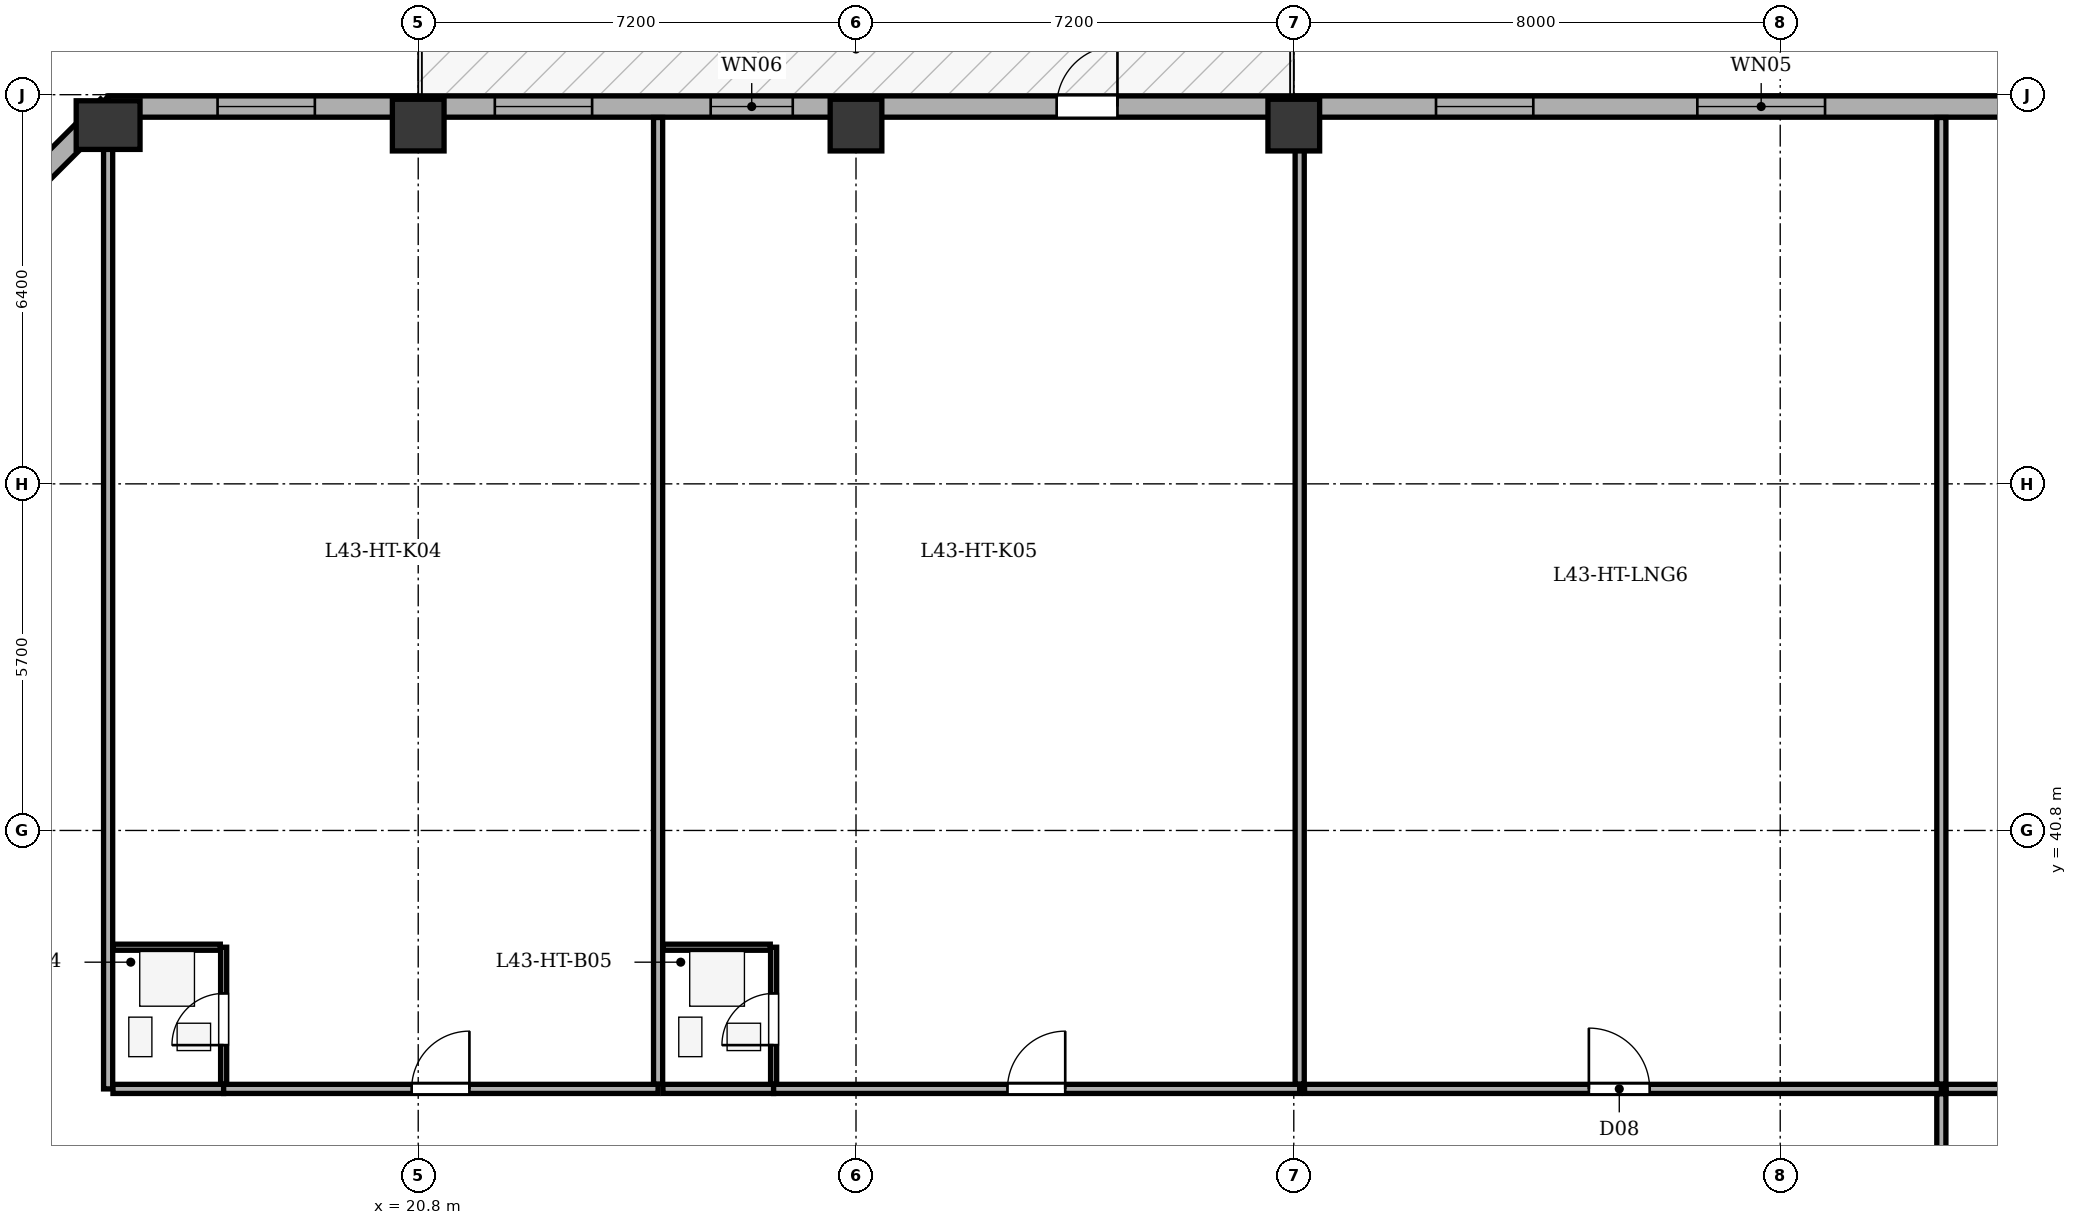
"""IFC4 building model, lengths in metres.
Left out: names, types, materials, properties, quantities, classifications, styles, units other than length and angle.
Written with IfcOpenShell. Run it as: python <this file> out.ifc"""

import sys

from ifc_helpers import new_model, si_unit, direction, frame, frame_2d, origin, origin_2d, place, context, subcontext, project, spatial, rectangle, extrude, element, fill, save


model = new_model("IFC4")
c1 = context("Model", 3, precision=1e-05, world=origin(), true_north=direction((0.0, 1.0)))
c2 = subcontext(c1, "Body", "Model", "MODEL_VIEW")
j1 = project(units=[si_unit("LENGTHUNIT", "METRE"), si_unit("PLANEANGLEUNIT", "RADIAN")], contexts=[c1])
p1 = place(None, origin())
s1 = spatial("IfcSite", under=j1, at=p1, CompositionType="ELEMENT")
p2 = place(p1, origin())
s2 = spatial("IfcBuilding", under=s1, at=p2, CompositionType="ELEMENT")
p3 = place(p2, frame((0.0, 0.0, 169.3)))
s3 = spatial("IfcBuildingStorey", under=s2, at=p3, CompositionType="ELEMENT", Elevation=169.3)
p4 = place(p3, frame((15.7, 52.4, 0.0), z_axis=(0.0, 0.0, 1.0), x_axis=(1.0, 0.0, 0.0)))
e1 = element("IfcColumn", 1, at=p4, inside=s3, PredefinedType="COLUMN", context=c2, shape_type="SweptSolid", body=[
    extrude(rectangle(XDim=0.8, YDim=1.05, at=origin_2d()), origin(), (0.0, 0.0, 1.0), 3.5),
])
for number, where, z_axis, x_axis in (
    (2, (20.8, 52.4, 0.0), (0.0, 0.0, 1.0), (1.0, 0.0, 0.0)),
    (3, (28.0, 52.4, 0.0), (0.0, 0.0, 1.0), (1.0, 0.0, 0.0)),
    (4, (35.2, 52.4, 0.0), (0.0, 0.0, 1.0), (1.0, 0.0, 0.0)),
):
    element("IfcColumn", number, at=place(p3, frame(where, z_axis=z_axis, x_axis=x_axis)), inside=s3, PredefinedType="COLUMN", context=c2, shape_type="SweptSolid", body=[
        extrude(rectangle(XDim=0.85, YDim=0.85, at=origin_2d()), origin(), (0.0, 0.0, 1.0), 3.5),
    ])
p5 = place(p3, frame((10.895, 47.9, 0.0), z_axis=(0.0, 0.0, 1.0), x_axis=(0.707088817216, 0.7071247447, 0.0)))
e5 = element("IfcWall", 5, at=p5, inside=s3, PredefinedType="STANDARD", context=c2, shape_type="SweptSolid", body=[
    extrude(rectangle(XDim=6.795, YDim=0.35, at=frame_2d((3.398, 0.0))), origin(), (0.0, 0.0, 1.0), 2.785),
])
p6 = place(p5, frame((2.698, 0.0, 0.75)))
e6 = element("IfcOpeningElement", 6, at=p6, cuts=e5, PredefinedType="OPENING", context=c2, shape_type="SweptSolid", body=[
    extrude(rectangle(XDim=1.4, YDim=1.65, at=frame_2d((0.7, 0.825))), frame((0.0, 0.185, 0.0), z_axis=(0.0, -1.0, 0.0), x_axis=(1.0, 0.0, 0.0)), (0.0, 0.0, 1.0), 0.37),
])
p7 = place(p3, frame((15.7, 52.705, 0.0), z_axis=(0.0, 0.0, 1.0), x_axis=(1.0, 0.0, 0.0)))
e7 = element("IfcWall", 7, at=p7, inside=s3, PredefinedType="STANDARD", context=c2, shape_type="SweptSolid", body=[
    extrude(rectangle(XDim=35.0, YDim=0.35, at=frame_2d((17.5, 0.0))), origin(), (0.0, 0.0, 1.0), 2.785),
])
p8 = place(p7, frame((15.6, 0.0, 0.0)))
e8 = element("IfcOpeningElement", 8, at=p8, cuts=e7, PredefinedType="OPENING", context=c2, shape_type="SweptSolid", body=[
    extrude(rectangle(XDim=1.0, YDim=2.02, at=frame_2d((0.5, 1.01))), frame((0.0, 0.185, 0.0), z_axis=(0.0, -1.0, 0.0), x_axis=(1.0, 0.0, 0.0)), (0.0, 0.0, 1.0), 0.37),
])
p9 = place(p7, frame((1.8, 0.0, 0.75)))
e9 = element("IfcOpeningElement", 9, at=p9, cuts=e7, PredefinedType="OPENING", context=c2, shape_type="SweptSolid", body=[
    extrude(rectangle(XDim=1.6, YDim=1.75, at=frame_2d((0.8, 0.875))), frame((0.0, 0.185, 0.0), z_axis=(0.0, -1.0, 0.0), x_axis=(1.0, 0.0, 0.0)), (0.0, 0.0, 1.0), 0.37),
])
p10 = place(p7, frame((6.36, 0.0, 0.75)))
e10 = element("IfcOpeningElement", 10, at=p10, cuts=e7, PredefinedType="OPENING", context=c2, shape_type="SweptSolid", body=[
    extrude(rectangle(XDim=1.6, YDim=1.75, at=frame_2d((0.8, 0.875))), frame((0.0, 0.185, 0.0), z_axis=(0.0, -1.0, 0.0), x_axis=(1.0, 0.0, 0.0)), (0.0, 0.0, 1.0), 0.37),
])
p11 = place(p7, frame((9.91, 0.0, 0.75)))
e11 = element("IfcOpeningElement", 11, at=p11, cuts=e7, PredefinedType="OPENING", context=c2, shape_type="SweptSolid", body=[
    extrude(rectangle(XDim=1.35, YDim=1.75, at=frame_2d((0.675, 0.875))), frame((0.0, 0.185, 0.0), z_axis=(0.0, -1.0, 0.0), x_axis=(1.0, 0.0, 0.0)), (0.0, 0.0, 1.0), 0.37),
])
p12 = place(p7, frame((21.839, 0.0, 0.75)))
e12 = element("IfcOpeningElement", 12, at=p12, cuts=e7, PredefinedType="OPENING", context=c2, shape_type="SweptSolid", body=[
    extrude(rectangle(XDim=1.6, YDim=1.75, at=frame_2d((0.8, 0.875))), frame((0.0, 0.185, 0.0), z_axis=(0.0, -1.0, 0.0), x_axis=(1.0, 0.0, 0.0)), (0.0, 0.0, 1.0), 0.37),
])
p13 = place(p7, frame((26.137, 0.0, 0.75)))
e13 = element("IfcOpeningElement", 13, at=p13, cuts=e7, PredefinedType="OPENING", context=c2, shape_type="SweptSolid", body=[
    extrude(rectangle(XDim=2.1, YDim=1.75, at=frame_2d((1.05, 0.875))), frame((0.0, 0.185, 0.0), z_axis=(0.0, -1.0, 0.0), x_axis=(1.0, 0.0, 0.0)), (0.0, 0.0, 1.0), 0.37),
])
p14 = place(p7, frame((31.637, 0.0, 0.75)))
e14 = element("IfcOpeningElement", 14, at=p14, cuts=e7, PredefinedType="OPENING", context=c2, shape_type="SweptSolid", body=[
    extrude(rectangle(XDim=1.6, YDim=1.75, at=frame_2d((0.8, 0.875))), frame((0.0, 0.185, 0.0), z_axis=(0.0, -1.0, 0.0), x_axis=(1.0, 0.0, 0.0)), (0.0, 0.0, 1.0), 0.37),
])
p15 = place(p3, frame((15.7, 36.55, 0.0), z_axis=(0.0, 0.0, 1.0), x_axis=(0.0, 1.0, 0.0)))
e15 = element("IfcWall", 15, at=p15, inside=s3, PredefinedType="PARTITIONING", context=c2, shape_type="SweptSolid", body=[
    extrude(rectangle(XDim=15.975, YDim=0.15, at=frame_2d((7.987, 0.0))), origin(), (0.0, 0.0, 1.0), 3.2),
])
p16 = place(p3, frame((15.78, 36.55, 0.0), z_axis=(0.0, 0.0, 1.0), x_axis=(1.0, 0.0, 0.0)))
e16 = element("IfcWall", 16, at=p16, inside=s3, PredefinedType="PARTITIONING", context=c2, shape_type="SweptSolid", body=[
    extrude(rectangle(XDim=1.82, YDim=0.15, at=frame_2d((0.91, 0.0))), origin(), (0.0, 0.0, 1.0), 3.2),
])
p17 = place(p3, frame((17.6, 36.55, 0.0), z_axis=(0.0, 0.0, 1.0), x_axis=(1.0, 0.0, 0.0)))
e17 = element("IfcWall", 17, at=p17, inside=s3, PredefinedType="PARTITIONING", context=c2, shape_type="SweptSolid", body=[
    extrude(rectangle(XDim=7.145, YDim=0.15, at=frame_2d((3.573, 0.0))), origin(), (0.0, 0.0, 1.0), 3.2),
])
p18 = place(p17, frame((3.092, 0.0, 0.0)))
e18 = element("IfcOpeningElement", 18, at=p18, cuts=e17, PredefinedType="OPENING", context=c2, shape_type="SweptSolid", body=[
    extrude(rectangle(XDim=0.95, YDim=2.1, at=frame_2d((0.475, 1.05))), frame((0.0, 0.085, 0.0), z_axis=(0.0, -1.0, 0.0), x_axis=(1.0, 0.0, 0.0)), (0.0, 0.0, 1.0), 0.17),
])
p19 = place(p3, frame((17.6, 36.63, 0.0), z_axis=(0.0, 0.0, 1.0), x_axis=(0.0, 1.0, 0.0)))
e19 = element("IfcWall", 19, at=p19, inside=s3, PredefinedType="PARTITIONING", context=c2, shape_type="SweptSolid", body=[
    extrude(rectangle(XDim=2.25, YDim=0.1, at=frame_2d((1.125, 0.0))), origin(), (0.0, 0.0, 1.0), 3.2),
])
p20 = place(p19, frame((0.64, 0.0, 0.0)))
e20 = element("IfcOpeningElement", 20, at=p20, cuts=e19, PredefinedType="OPENING", context=c2, shape_type="SweptSolid", body=[
    extrude(rectangle(XDim=0.85, YDim=2.05, at=frame_2d((0.425, 1.025))), frame((0.0, 0.06, 0.0), z_axis=(0.0, -1.0, 0.0), x_axis=(1.0, 0.0, 0.0)), (0.0, 0.0, 1.0), 0.12),
])
p21 = place(p3, frame((15.78, 38.88, 0.0), z_axis=(0.0, 0.0, 1.0), x_axis=(1.0, 0.0, 0.0)))
e21 = element("IfcWall", 21, at=p21, inside=s3, PredefinedType="PARTITIONING", context=c2, shape_type="SweptSolid", body=[
    extrude(rectangle(XDim=1.765, YDim=0.1, at=frame_2d((0.882, 0.0))), origin(), (0.0, 0.0, 1.0), 3.2),
])
p22 = place(p3, frame((24.745, 36.63, 0.0), z_axis=(0.0, 0.0, 1.0), x_axis=(0.0, 1.0, 0.0)))
e22 = element("IfcWall", 22, at=p22, inside=s3, PredefinedType="PARTITIONING", context=c2, shape_type="SweptSolid", body=[
    extrude(rectangle(XDim=15.895, YDim=0.15, at=frame_2d((7.948, 0.0))), origin(), (0.0, 0.0, 1.0), 3.2),
])
p23 = place(p3, frame((24.825, 36.55, 0.0), z_axis=(0.0, 0.0, 1.0), x_axis=(1.0, 0.0, 0.0)))
e23 = element("IfcWall", 23, at=p23, inside=s3, PredefinedType="PARTITIONING", context=c2, shape_type="SweptSolid", body=[
    extrude(rectangle(XDim=1.82, YDim=0.15, at=frame_2d((0.91, 0.0))), origin(), (0.0, 0.0, 1.0), 3.2),
])
p24 = place(p3, frame((26.645, 36.55, 0.0), z_axis=(0.0, 0.0, 1.0), x_axis=(1.0, 0.0, 0.0)))
e24 = element("IfcWall", 24, at=p24, inside=s3, PredefinedType="PARTITIONING", context=c2, shape_type="SweptSolid", body=[
    extrude(rectangle(XDim=8.652, YDim=0.15, at=frame_2d((4.326, 0.0))), origin(), (0.0, 0.0, 1.0), 3.2),
])
p25 = place(p24, frame((3.846, 0.0, 0.0)))
e25 = element("IfcOpeningElement", 25, at=p25, cuts=e24, PredefinedType="OPENING", context=c2, shape_type="SweptSolid", body=[
    extrude(rectangle(XDim=0.95, YDim=2.1, at=frame_2d((0.475, 1.05))), frame((0.0, 0.085, 0.0), z_axis=(0.0, -1.0, 0.0), x_axis=(1.0, 0.0, 0.0)), (0.0, 0.0, 1.0), 0.17),
])
p26 = place(p3, frame((26.645, 36.63, 0.0), z_axis=(0.0, 0.0, 1.0), x_axis=(0.0, 1.0, 0.0)))
e26 = element("IfcWall", 26, at=p26, inside=s3, PredefinedType="PARTITIONING", context=c2, shape_type="SweptSolid", body=[
    extrude(rectangle(XDim=2.25, YDim=0.1, at=frame_2d((1.125, 0.0))), origin(), (0.0, 0.0, 1.0), 3.2),
])
p27 = place(p26, frame((0.64, 0.0, 0.0)))
e27 = element("IfcOpeningElement", 27, at=p27, cuts=e26, PredefinedType="OPENING", context=c2, shape_type="SweptSolid", body=[
    extrude(rectangle(XDim=0.85, YDim=2.05, at=frame_2d((0.425, 1.025))), frame((0.0, 0.06, 0.0), z_axis=(0.0, -1.0, 0.0), x_axis=(1.0, 0.0, 0.0)), (0.0, 0.0, 1.0), 0.12),
])
p28 = place(p3, frame((24.825, 38.88, 0.0), z_axis=(0.0, 0.0, 1.0), x_axis=(1.0, 0.0, 0.0)))
e28 = element("IfcWall", 28, at=p28, inside=s3, PredefinedType="PARTITIONING", context=c2, shape_type="SweptSolid", body=[
    extrude(rectangle(XDim=1.765, YDim=0.1, at=frame_2d((0.883, 0.0))), origin(), (0.0, 0.0, 1.0), 3.2),
])
p29 = place(p3, frame((35.297, 36.63, 0.0), z_axis=(0.0, 0.0, 1.0), x_axis=(0.0, 1.0, 0.0)))
e29 = element("IfcWall", 29, at=p29, inside=s3, PredefinedType="PARTITIONING", context=c2, shape_type="SweptSolid", body=[
    extrude(rectangle(XDim=15.895, YDim=0.15, at=frame_2d((7.948, 0.0))), origin(), (0.0, 0.0, 1.0), 2.535),
])
p30 = place(p3, frame((35.377, 36.55, 0.0), z_axis=(0.0, 0.0, 1.0), x_axis=(1.0, 0.0, 0.0)))
e30 = element("IfcWall", 30, at=p30, inside=s3, PredefinedType="PARTITIONING", context=c2, shape_type="SweptSolid", body=[
    extrude(rectangle(XDim=10.473, YDim=0.15, at=frame_2d((5.237, 0.0))), origin(), (0.0, 0.0, 1.0), 3.2),
])
p31 = place(p30, frame((4.676, 0.0, 0.0)))
e31 = element("IfcOpeningElement", 31, at=p31, cuts=e30, PredefinedType="OPENING", context=c2, shape_type="SweptSolid", body=[
    extrude(rectangle(XDim=1.0, YDim=2.1, at=frame_2d((0.5, 1.05))), frame((0.0, 0.085, 0.0), z_axis=(0.0, -1.0, 0.0), x_axis=(1.0, 0.0, 0.0)), (0.0, 0.0, 1.0), 0.17),
])
p32 = place(p3, frame((45.85, 36.63, 0.0), z_axis=(0.0, 0.0, 1.0), x_axis=(0.0, 1.0, 0.0)))
e32 = element("IfcWall", 32, at=p32, inside=s3, PredefinedType="PARTITIONING", context=c2, shape_type="SweptSolid", body=[
    extrude(rectangle(XDim=15.895, YDim=0.15, at=frame_2d((7.948, 0.0))), origin(), (0.0, 0.0, 1.0), 3.2),
])
p33 = place(p3, frame((45.93, 36.55, 0.0), z_axis=(0.0, 0.0, 1.0), x_axis=(1.0, 0.0, 0.0)))
e33 = element("IfcWall", 33, at=p33, inside=s3, PredefinedType="PARTITIONING", context=c2, shape_type="SweptSolid", body=[
    extrude(rectangle(XDim=9.395, YDim=0.15, at=frame_2d((4.698, 0.0))), origin(), (0.0, 0.0, 1.0), 3.2),
])
p34 = place(p3, frame((45.85, 17.93, 0.0), z_axis=(0.0, 0.0, 1.0), x_axis=(0.0, 1.0, 0.0)))
e34 = element("IfcWall", 34, at=p34, inside=s3, PredefinedType="PARTITIONING", context=c2, shape_type="SweptSolid", body=[
    extrude(rectangle(XDim=18.54, YDim=0.15, at=frame_2d((9.27, 0.0))), origin(), (0.0, 0.0, 1.0), 3.2),
])
p35 = place(p34, frame((8.79, 0.0, 0.0)))
e35 = element("IfcOpeningElement", 35, at=p35, cuts=e34, PredefinedType="OPENING", context=c2, shape_type="SweptSolid", body=[
    extrude(rectangle(XDim=0.95, YDim=2.1, at=frame_2d((0.475, 1.05))), frame((0.0, 0.085, 0.0), z_axis=(0.0, -1.0, 0.0), x_axis=(1.0, 0.0, 0.0)), (0.0, 0.0, 1.0), 0.17),
])
p36 = place(p8, origin())
e36 = element("IfcDoor", 36, at=p36, inside=s3, OperationType="SINGLE_SWING_RIGHT", PredefinedType="DOOR", context=c2, shape_type="SweptSolid", body=[
    extrude(rectangle(XDim=1.0, YDim=2.02, at=frame_2d((0.5, 1.01))), frame((0.0, 0.025, 0.0), z_axis=(0.0, -1.0, 0.0), x_axis=(1.0, 0.0, 0.0)), (0.0, 0.0, 1.0), 0.05),
])
fill(e8, e36)
p37 = place(p9, origin())
e37 = element("IfcWindow", 37, at=p37, inside=s3, PartitioningType="SINGLE_PANEL", PredefinedType="WINDOW", context=c2, shape_type="SweptSolid", body=[
    extrude(rectangle(XDim=1.6, YDim=1.75, at=frame_2d((0.8, 0.875))), frame((0.0, -0.01, 0.0), z_axis=(0.0, -1.0, 0.0), x_axis=(1.0, 0.0, 0.0)), (0.0, 0.0, 1.0), 0.06),
])
fill(e9, e37)
p38 = place(p10, origin())
e38 = element("IfcWindow", 38, at=p38, inside=s3, PartitioningType="SINGLE_PANEL", PredefinedType="WINDOW", context=c2, shape_type="SweptSolid", body=[
    extrude(rectangle(XDim=1.6, YDim=1.75, at=frame_2d((0.8, 0.875))), frame((0.0, -0.01, 0.0), z_axis=(0.0, -1.0, 0.0), x_axis=(1.0, 0.0, 0.0)), (0.0, 0.0, 1.0), 0.06),
])
fill(e10, e38)
p39 = place(p11, origin())
e39 = element("IfcWindow", 39, at=p39, inside=s3, PartitioningType="SINGLE_PANEL", PredefinedType="WINDOW", context=c2, shape_type="SweptSolid", body=[
    extrude(rectangle(XDim=1.35, YDim=1.75, at=frame_2d((0.675, 0.875))), frame((0.0, -0.01, 0.0), z_axis=(0.0, -1.0, 0.0), x_axis=(1.0, 0.0, 0.0)), (0.0, 0.0, 1.0), 0.06),
])
fill(e11, e39)
p40 = place(p12, origin())
e40 = element("IfcWindow", 40, at=p40, inside=s3, PartitioningType="SINGLE_PANEL", PredefinedType="WINDOW", context=c2, shape_type="SweptSolid", body=[
    extrude(rectangle(XDim=1.6, YDim=1.75, at=frame_2d((0.8, 0.875))), frame((0.0, -0.01, 0.0), z_axis=(0.0, -1.0, 0.0), x_axis=(1.0, 0.0, 0.0)), (0.0, 0.0, 1.0), 0.06),
])
fill(e12, e40)
p41 = place(p13, origin())
e41 = element("IfcWindow", 41, at=p41, inside=s3, PartitioningType="SINGLE_PANEL", PredefinedType="WINDOW", context=c2, shape_type="SweptSolid", body=[
    extrude(rectangle(XDim=2.1, YDim=1.75, at=frame_2d((1.05, 0.875))), frame((0.0, -0.01, 0.0), z_axis=(0.0, -1.0, 0.0), x_axis=(1.0, 0.0, 0.0)), (0.0, 0.0, 1.0), 0.06),
])
fill(e13, e41)
p42 = place(p20, origin())
e42 = element("IfcDoor", 42, at=p42, inside=s3, OperationType="SINGLE_SWING_LEFT", PredefinedType="DOOR", context=c2, shape_type="SweptSolid", body=[
    extrude(rectangle(XDim=0.85, YDim=2.05, at=frame_2d((0.425, 1.025))), frame((0.0, 0.025, 0.0), z_axis=(0.0, -1.0, 0.0), x_axis=(1.0, 0.0, 0.0)), (0.0, 0.0, 1.0), 0.05),
])
fill(e20, e42)
p43 = place(p18, origin())
e43 = element("IfcDoor", 43, at=p43, inside=s3, OperationType="SINGLE_SWING_RIGHT", PredefinedType="DOOR", context=c2, shape_type="SweptSolid", body=[
    extrude(rectangle(XDim=0.95, YDim=2.1, at=frame_2d((0.475, 1.05))), frame((0.0, 0.025, 0.0), z_axis=(0.0, -1.0, 0.0), x_axis=(1.0, 0.0, 0.0)), (0.0, 0.0, 1.0), 0.05),
])
fill(e18, e43)
p44 = place(p27, origin())
e44 = element("IfcDoor", 44, at=p44, inside=s3, OperationType="SINGLE_SWING_LEFT", PredefinedType="DOOR", context=c2, shape_type="SweptSolid", body=[
    extrude(rectangle(XDim=0.85, YDim=2.05, at=frame_2d((0.425, 1.025))), frame((0.0, 0.025, 0.0), z_axis=(0.0, -1.0, 0.0), x_axis=(1.0, 0.0, 0.0)), (0.0, 0.0, 1.0), 0.05),
])
fill(e27, e44)
p45 = place(p25, origin())
e45 = element("IfcDoor", 45, at=p45, inside=s3, OperationType="SINGLE_SWING_RIGHT", PredefinedType="DOOR", context=c2, shape_type="SweptSolid", body=[
    extrude(rectangle(XDim=0.95, YDim=2.1, at=frame_2d((0.475, 1.05))), frame((0.0, 0.025, 0.0), z_axis=(0.0, -1.0, 0.0), x_axis=(1.0, 0.0, 0.0)), (0.0, 0.0, 1.0), 0.05),
])
fill(e25, e45)
p46 = place(p31, origin())
e46 = element("IfcDoor", 46, at=p46, inside=s3, OperationType="SINGLE_SWING_LEFT", PredefinedType="DOOR", context=c2, shape_type="SweptSolid", body=[
    extrude(rectangle(XDim=1.0, YDim=2.1, at=frame_2d((0.5, 1.05))), frame((0.0, 0.025, 0.0), z_axis=(0.0, -1.0, 0.0), x_axis=(1.0, 0.0, 0.0)), (0.0, 0.0, 1.0), 0.05),
])
fill(e31, e46)
save(model, sys.argv[1])
